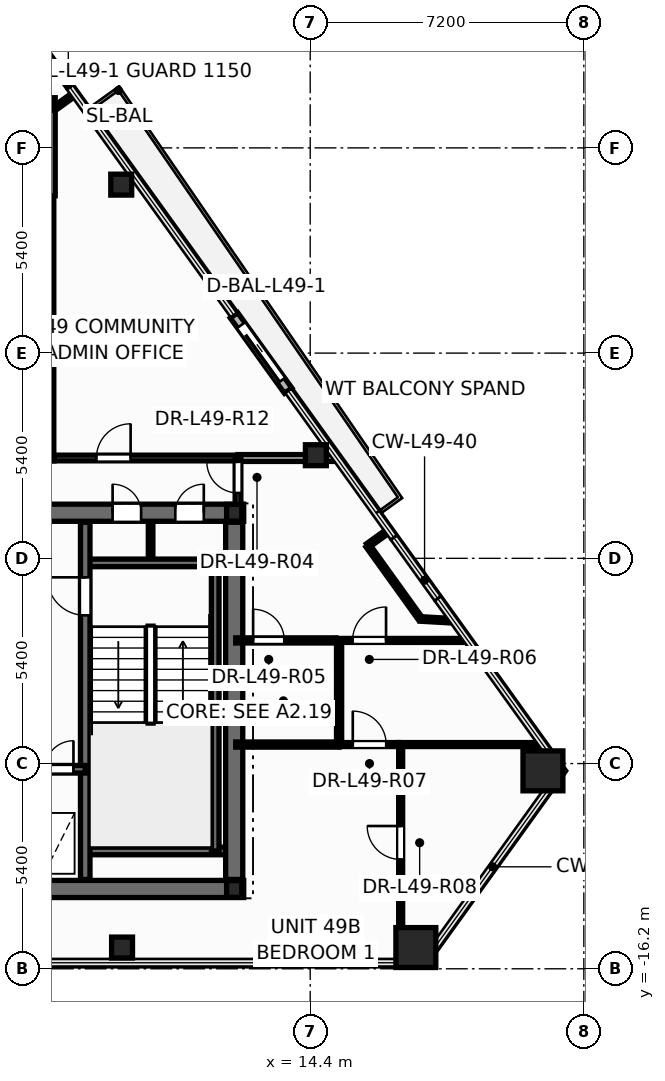
"""IFC4 building model, lengths in metres.
Left out: names, types, materials, properties, quantities, classifications, styles, units other than length and angle.
Written with IfcOpenShell. Run it as: python <this file> out.ifc"""

import sys

from ifc_helpers import new_model, si_unit, direction, frame, frame_2d, origin, origin_2d, place, context, subcontext, project, spatial, rectangle, hollow_rectangle, hollow_circle, i_section, extrude, element, fill, save


model = new_model("IFC4")
c1 = context("Model", 3, precision=1e-05, world=origin(), true_north=direction((0.0, 1.0)))
c2 = subcontext(c1, "Body", "Model", "MODEL_VIEW")
j1 = project(units=[si_unit("LENGTHUNIT", "METRE"), si_unit("PLANEANGLEUNIT", "RADIAN")], contexts=[c1])
p1 = place(None, origin())
s1 = spatial("IfcSite", under=j1, at=p1, CompositionType="ELEMENT")
p2 = place(p1, origin())
s2 = spatial("IfcBuilding", under=s1, at=p2, CompositionType="ELEMENT")
p3 = place(p2, frame((0.0, 0.0, 189.3)))
s3 = spatial("IfcBuildingStorey", under=s2, at=p3, CompositionType="ELEMENT", Elevation=189.3)
for number, where, z_axis, x_axis in (
    (1, (17.18, -15.641, 0.0), (0.0, 0.0, 1.0), (1.0, 0.0, 0.0)),
    (2, (20.524, -10.992, 0.0), (0.0, 0.0, 1.0), (1.0, 0.0, 0.0)),
):
    element("IfcColumn", number, at=place(p3, frame(where, z_axis=z_axis, x_axis=x_axis)), inside=s3, PredefinedType="COLUMN", context=c2, shape_type="SweptSolid", body=[
        extrude(hollow_rectangle(XDim=1.05, YDim=1.05, WallThickness=0.045, at=origin_2d()), origin(), (0.0, 0.0, 1.0), 3.6),
    ])
for number, where, z_axis, x_axis in (
    (3, (9.449, -15.641, 0.0), (0.0, 0.0, 1.0), (1.0, 0.0, 0.0)),
    (4, (14.549, -2.686, 0.0), (0.0, 0.0, 1.0), (1.0, 0.0, 0.0)),
    (5, (9.427, 4.433, 0.0), (0.0, 0.0, 1.0), (1.0, 0.0, 0.0)),
):
    element("IfcColumn", number, at=place(p3, frame(where, z_axis=z_axis, x_axis=x_axis)), inside=s3, PredefinedType="COLUMN", context=c2, shape_type="SweptSolid", body=[
        extrude(hollow_circle(Radius=0.275, WallThickness=0.024, at=origin_2d()), origin(), (0.0, 0.0, 1.0), 3.6),
    ])
for number, where, z_axis, x_axis in (
    (6, (12.4, -14.1, 0.0), (0.0, 0.0, 1.0), (1.0, 0.0, 0.0)),
    (7, (12.4, -4.2, 0.0), (0.0, 0.0, 1.0), (1.0, 0.0, 0.0)),
):
    element("IfcColumn", number, at=place(p3, frame(where, z_axis=z_axis, x_axis=x_axis)), inside=s3, PredefinedType="COLUMN", context=c2, shape_type="SweptSolid", body=[
        extrude(i_section(OverallWidth=0.4, OverallDepth=0.44, WebThickness=0.028, FlangeThickness=0.04, at=origin_2d()), origin(), (0.0, 0.0, 1.0), 3.6),
    ])
p4 = place(p3, frame((13.819, -0.987, -0.015), z_axis=(0.0, 0.0, 1.0), x_axis=(-0.583951454754, 0.811788579921, 0.0)))
e8 = element("IfcWall", 8, at=p4, inside=s3, PredefinedType="STANDARD", context=c2, shape_type="SweptSolid", body=[
    extrude(rectangle(XDim=2.44, YDim=0.24, at=frame_2d((1.22, 0.0))), origin(), (0.0, 0.0, 1.0), 2.807),
])
p5 = place(p4, frame((0.32, 0.0, 0.015)))
e9 = element("IfcOpeningElement", 9, at=p5, cuts=e8, PredefinedType="OPENING", context=c2, shape_type="SweptSolid", body=[
    extrude(rectangle(XDim=1.806, YDim=2.204, at=frame_2d((0.9, 1.102))), frame((0.0, 0.13, 0.0), z_axis=(0.0, -1.0, 0.0), x_axis=(1.0, 0.0, 0.0)), (0.0, 0.0, 1.0), 0.26),
])
p6 = place(p3, frame((10.2, -5.52, 0.0), z_axis=(0.0, 0.0, 1.0), x_axis=(0.0, 1.0, 0.0)))
e10 = element("IfcWall", 10, at=p6, inside=s3, PredefinedType="PARTITIONING", context=c2, shape_type="SweptSolid", body=[
    extrude(rectangle(XDim=1.12, YDim=0.12, at=frame_2d((0.56, 0.0))), origin(), (0.0, 0.0, 1.0), 3.35),
])
p7 = place(p3, frame((-12.65, -14.1, 0.0), z_axis=(0.0, 0.0, 1.0), x_axis=(1.0, 0.0, 0.0)))
e11 = element("IfcWall", 11, at=p7, inside=s3, PredefinedType="SHEAR", context=c2, shape_type="SweptSolid", body=[
    extrude(rectangle(XDim=25.3, YDim=0.45, at=frame_2d((12.65, 0.0))), origin(), (0.0, 0.0, 1.0), 3.6),
])
p8 = place(p3, frame((-12.65, -4.2, 0.0), z_axis=(0.0, 0.0, 1.0), x_axis=(1.0, 0.0, 0.0)))
e12 = element("IfcWall", 12, at=p8, inside=s3, PredefinedType="SHEAR", context=c2, shape_type="SweptSolid", body=[
    extrude(rectangle(XDim=25.3, YDim=0.45, at=frame_2d((12.65, 0.0))), origin(), (0.0, 0.0, 1.0), 3.6),
])
p9 = place(p8, frame((1.85, 0.0, 0.0)))
e13 = element("IfcOpeningElement", 13, at=p9, cuts=e12, PredefinedType="OPENING", context=c2, shape_type="SweptSolid", body=[
    extrude(rectangle(XDim=0.756, YDim=2.054, at=frame_2d((0.375, 1.027))), frame((0.0, 0.235, 0.0), z_axis=(0.0, -1.0, 0.0), x_axis=(1.0, 0.0, 0.0)), (0.0, 0.0, 1.0), 0.47),
])
p10 = place(p8, frame((21.85, 0.0, 0.0)))
e14 = element("IfcOpeningElement", 14, at=p10, cuts=e12, PredefinedType="OPENING", context=c2, shape_type="SweptSolid", body=[
    extrude(rectangle(XDim=0.756, YDim=2.054, at=frame_2d((0.375, 1.027))), frame((0.0, 0.235, 0.0), z_axis=(0.0, -1.0, 0.0), x_axis=(1.0, 0.0, 0.0)), (0.0, 0.0, 1.0), 0.47),
])
p11 = place(p8, frame((23.5, 0.0, 0.0)))
e15 = element("IfcOpeningElement", 15, at=p11, cuts=e12, PredefinedType="OPENING", context=c2, shape_type="SweptSolid", body=[
    extrude(rectangle(XDim=0.756, YDim=2.054, at=frame_2d((0.375, 1.027))), frame((0.0, 0.235, 0.0), z_axis=(0.0, -1.0, 0.0), x_axis=(1.0, 0.0, 0.0)), (0.0, 0.0, 1.0), 0.47),
])
p12 = place(p8, frame((5.85, 0.0, 0.0)))
e16 = element("IfcOpeningElement", 16, at=p12, cuts=e12, PredefinedType="OPENING", context=c2, shape_type="SweptSolid", body=[
    extrude(rectangle(XDim=1.006, YDim=2.104, at=frame_2d((0.5, 1.052))), frame((0.0, 0.235, 0.0), z_axis=(0.0, -1.0, 0.0), x_axis=(1.0, 0.0, 0.0)), (0.0, 0.0, 1.0), 0.47),
])
p13 = place(p8, frame((10.35, 0.0, 0.0)))
e17 = element("IfcOpeningElement", 17, at=p13, cuts=e12, PredefinedType="OPENING", context=c2, shape_type="SweptSolid", body=[
    extrude(rectangle(XDim=1.406, YDim=2.154, at=frame_2d((0.7, 1.077))), frame((0.0, 0.235, 0.0), z_axis=(0.0, -1.0, 0.0), x_axis=(1.0, 0.0, 0.0)), (0.0, 0.0, 1.0), 0.47),
])
p14 = place(p8, frame((18.45, 0.0, 0.0)))
e18 = element("IfcOpeningElement", 18, at=p14, cuts=e12, PredefinedType="OPENING", context=c2, shape_type="SweptSolid", body=[
    extrude(rectangle(XDim=1.006, YDim=2.104, at=frame_2d((0.5, 1.052))), frame((0.0, 0.235, 0.0), z_axis=(0.0, -1.0, 0.0), x_axis=(1.0, 0.0, 0.0)), (0.0, 0.0, 1.0), 0.47),
])
for number, where, z_axis, x_axis in (
    (19, (8.48, -5.52, 0.0), (0.0, 0.0, 1.0), (1.0, 0.0, 0.0)),
    (20, (8.48, -13.1, 0.0), (0.0, 0.0, 1.0), (1.0, 0.0, 0.0)),
):
    element("IfcWall", number, at=place(p3, frame(where, z_axis=z_axis, x_axis=x_axis)), inside=s3, PredefinedType="SOLIDWALL", context=c2, shape_type="SweptSolid", body=[
        extrude(rectangle(XDim=3.87, YDim=0.2, at=frame_2d((1.935, 0.0))), origin(), (0.0, 0.0, 1.0), 3.6),
    ])
p15 = place(p3, frame((11.9, -13.1, 0.0), z_axis=(0.0, 0.0, 1.0), x_axis=(0.0, 1.0, 0.0)))
e21 = element("IfcWall", 21, at=p15, inside=s3, PredefinedType="SOLIDWALL", context=c2, shape_type="SweptSolid", body=[
    extrude(rectangle(XDim=7.58, YDim=0.2, at=frame_2d((3.79, 0.0))), origin(), (0.0, 0.0, 1.0), 3.6),
])
p16 = place(p3, frame((8.48, -13.85, 0.0), z_axis=(0.0, 0.0, 1.0), x_axis=(0.0, 1.0, 0.0)))
e22 = element("IfcWall", 22, at=p16, inside=s3, PredefinedType="SHEAR", context=c2, shape_type="SweptSolid", body=[
    extrude(rectangle(XDim=9.4, YDim=0.25, at=frame_2d((4.7, 0.0))), origin(), (0.0, 0.0, 1.0), 3.6),
])
p17 = place(p16, frame((6.95, 0.0, 0.0)))
e23 = element("IfcOpeningElement", 23, at=p17, cuts=e22, PredefinedType="OPENING", context=c2, shape_type="SweptSolid", body=[
    extrude(rectangle(XDim=1.006, YDim=2.104, at=frame_2d((0.5, 1.052))), frame((0.0, 0.135, 0.0), z_axis=(0.0, -1.0, 0.0), x_axis=(1.0, 0.0, 0.0)), (0.0, 0.0, 1.0), 0.27),
])
p18 = place(p3, frame((5.12, -10.95, 0.0), z_axis=(0.0, 0.0, 1.0), x_axis=(1.0, 0.0, 0.0)))
e24 = element("IfcWall", 24, at=p18, inside=s3, PredefinedType="SOLIDWALL", context=c2, shape_type="SweptSolid", body=[
    extrude(rectangle(XDim=3.36, YDim=0.2, at=frame_2d((1.68, 0.0))), origin(), (0.0, 0.0, 1.0), 3.6),
])
p19 = place(p18, frame((0.42, 0.0, 0.0)))
e25 = element("IfcOpeningElement", 25, at=p19, cuts=e24, PredefinedType="OPENING", context=c2, shape_type="SweptSolid", body=[
    extrude(rectangle(XDim=1.106, YDim=2.104, at=frame_2d((0.55, 1.052))), frame((0.0, 0.11, 0.0), z_axis=(0.0, -1.0, 0.0), x_axis=(1.0, 0.0, 0.0)), (0.0, 0.0, 1.0), 0.22),
])
p20 = place(p18, frame((2.3, 0.0, 0.0)))
e26 = element("IfcOpeningElement", 26, at=p20, cuts=e24, PredefinedType="OPENING", context=c2, shape_type="SweptSolid", body=[
    extrude(rectangle(XDim=0.756, YDim=2.054, at=frame_2d((0.375, 1.027))), frame((0.0, 0.11, 0.0), z_axis=(0.0, -1.0, 0.0), x_axis=(1.0, 0.0, 0.0)), (0.0, 0.0, 1.0), 0.22),
])
p21 = place(p3, frame((12.4, -13.85, 0.0), z_axis=(0.0, 0.0, 1.0), x_axis=(0.0, 1.0, 0.0)))
e27 = element("IfcWall", 27, at=p21, inside=s3, PredefinedType="SHEAR", context=c2, shape_type="SweptSolid", body=[
    extrude(rectangle(XDim=9.4, YDim=0.45, at=frame_2d((4.7, 0.0))), origin(), (0.0, 0.0, 1.0), 3.6),
])
p22 = place(p3, frame((7.6, -2.76, 0.0), z_axis=(0.0, 0.0, 1.0), x_axis=(0.0, 1.0, 0.0)))
e28 = element("IfcWall", 28, at=p22, inside=s3, PredefinedType="PARTITIONING", context=c2, shape_type="SweptSolid", body=[
    extrude(rectangle(XDim=6.96, YDim=0.105, at=frame_2d((3.48, 0.0))), origin(), (0.0, 0.0, 1.0), 2.625),
])
p23 = place(p3, frame((16.78, -16.041, 0.0), z_axis=(0.0, 0.0, 1.0), x_axis=(0.0, 1.0, 0.0)))
e29 = element("IfcWall", 29, at=p23, inside=s3, PredefinedType="PARTITIONING", context=c2, shape_type="SweptSolid", body=[
    extrude(rectangle(XDim=5.741, YDim=0.105, at=frame_2d((2.871, 0.0))), origin(), (0.0, 0.0, 1.0), 2.792),
])
p24 = place(p23, frame((2.718, 0.0, 0.0)))
e30 = element("IfcOpeningElement", 30, at=p24, cuts=e29, PredefinedType="OPENING", context=c2, shape_type="SweptSolid", body=[
    extrude(rectangle(XDim=0.886, YDim=2.104, at=frame_2d((0.44, 1.052))), frame((0.0, 0.062, 0.0), z_axis=(0.0, -1.0, 0.0), x_axis=(1.0, 0.0, 0.0)), (0.0, 0.0, 1.0), 0.125),
])
p25 = place(p3, frame((2.36, -2.76, 0.0), z_axis=(0.0, 0.0, 1.0), x_axis=(1.0, 0.0, 0.0)))
e31 = element("IfcWall", 31, at=p25, inside=s3, PredefinedType="PARTITIONING", context=c2, shape_type="SweptSolid", body=[
    extrude(rectangle(XDim=5.3, YDim=0.15, at=frame_2d((2.65, 0.0))), origin(), (0.0, 0.0, 1.0), 2.325),
])
p26 = place(p3, frame((2.36, 4.2, 0.0), z_axis=(0.0, 0.0, 1.0), x_axis=(1.0, 0.0, 0.0)))
e32 = element("IfcWall", 32, at=p26, inside=s3, PredefinedType="PARTITIONING", context=c2, shape_type="SweptSolid", body=[
    extrude(rectangle(XDim=5.24, YDim=0.18, at=frame_2d((2.62, 0.0))), origin(), (0.0, 0.0, 1.0), 2.625),
])
p27 = place(p3, frame((7.662, -2.76, 0.0), z_axis=(0.0, 0.0, 1.0), x_axis=(1.0, 0.0, 0.0)))
e33 = element("IfcWall", 33, at=p27, inside=s3, PredefinedType="PARTITIONING", context=c2, shape_type="SweptSolid", body=[
    extrude(rectangle(XDim=4.838, YDim=0.15, at=frame_2d((2.419, 0.0))), origin(), (0.0, 0.0, 1.0), 3.35),
])
p28 = place(p27, frame((1.112, 0.0, 0.0)))
e34 = element("IfcOpeningElement", 34, at=p28, cuts=e33, PredefinedType="OPENING", context=c2, shape_type="SweptSolid", body=[
    extrude(rectangle(XDim=0.906, YDim=2.104, at=frame_2d((0.45, 1.052))), frame((0.0, 0.085, 0.0), z_axis=(0.0, -1.0, 0.0), x_axis=(1.0, 0.0, 0.0)), (0.0, 0.0, 1.0), 0.17),
])
p29 = place(p3, frame((16.72, -10.3, 0.0), z_axis=(0.0, 0.0, 1.0), x_axis=(1.0, 0.0, 0.0)))
e35 = element("IfcWall", 35, at=p29, inside=s3, PredefinedType="PARTITIONING", context=c2, shape_type="SweptSolid", body=[
    extrude(rectangle(XDim=3.799, YDim=0.105, at=frame_2d((1.899, 0.0))), origin(), (0.0, 0.0, 1.0), 2.325),
])
p30 = place(p3, frame((15.08, -7.56, 0.0), z_axis=(0.0, 0.0, 1.0), x_axis=(1.0, 0.0, 0.0)))
e36 = element("IfcWall", 36, at=p30, inside=s3, PredefinedType="PARTITIONING", context=c2, shape_type="SweptSolid", body=[
    extrude(rectangle(XDim=3.468, YDim=0.105, at=frame_2d((1.734, 0.0))), origin(), (0.0, 0.0, 1.0), 2.325),
])
p31 = place(p30, frame((0.436, 0.0, 0.0)))
e37 = element("IfcOpeningElement", 37, at=p31, cuts=e36, PredefinedType="OPENING", context=c2, shape_type="SweptSolid", body=[
    extrude(rectangle(XDim=0.886, YDim=2.104, at=frame_2d((0.44, 1.052))), frame((0.0, 0.062, 0.0), z_axis=(0.0, -1.0, 0.0), x_axis=(1.0, 0.0, 0.0)), (0.0, 0.0, 1.0), 0.125),
])
p32 = place(p3, frame((12.44, -7.56, 0.0), z_axis=(0.0, 0.0, 1.0), x_axis=(1.0, 0.0, 0.0)))
e38 = element("IfcWall", 38, at=p32, inside=s3, PredefinedType="PARTITIONING", context=c2, shape_type="SweptSolid", body=[
    extrude(rectangle(XDim=2.638, YDim=0.135, at=frame_2d((1.319, 0.0))), origin(), (0.0, 0.0, 1.0), 2.792),
])
p33 = place(p32, frame((0.458, 0.0, 0.0)))
e39 = element("IfcOpeningElement", 39, at=p33, cuts=e38, PredefinedType="OPENING", context=c2, shape_type="SweptSolid", body=[
    extrude(rectangle(XDim=0.826, YDim=2.104, at=frame_2d((0.41, 1.052))), frame((0.0, 0.078, 0.0), z_axis=(0.0, -1.0, 0.0), x_axis=(1.0, 0.0, 0.0)), (0.0, 0.0, 1.0), 0.155),
])
p34 = place(p3, frame((15.16, -10.3, 0.0), z_axis=(0.0, 0.0, 1.0), x_axis=(0.0, 1.0, 0.0)))
e40 = element("IfcWall", 40, at=p34, inside=s3, PredefinedType="PARTITIONING", context=c2, shape_type="SweptSolid", body=[
    extrude(rectangle(XDim=2.74, YDim=0.135, at=frame_2d((1.37, 0.0))), origin(), (0.0, 0.0, 1.0), 3.35),
])
p35 = place(p3, frame((12.44, -10.3, 0.0), z_axis=(0.0, 0.0, 1.0), x_axis=(1.0, 0.0, 0.0)))
e41 = element("IfcWall", 41, at=p35, inside=s3, PredefinedType="PARTITIONING", context=c2, shape_type="SweptSolid", body=[
    extrude(rectangle(XDim=2.72, YDim=0.135, at=frame_2d((1.36, 0.0))), origin(), (0.0, 0.0, 1.0), 2.792),
])
p36 = place(p3, frame((12.5, -2.76, 0.0), z_axis=(0.0, 0.0, 1.0), x_axis=(1.0, 0.0, 0.0)))
e42 = element("IfcWall", 42, at=p36, inside=s3, PredefinedType="PARTITIONING", context=c2, shape_type="SweptSolid", body=[
    extrude(rectangle(XDim=2.595, YDim=0.18, at=frame_2d((1.297, 0.0))), origin(), (0.0, 0.0, 1.0), 2.625),
])
p37 = place(p3, frame((7.6, 4.14, 0.0), z_axis=(0.0, 0.0, 1.0), x_axis=(0.0, 1.0, 0.0)))
e43 = element("IfcWall", 43, at=p37, inside=s3, PredefinedType="PARTITIONING", context=c2, shape_type="SweptSolid", body=[
    extrude(rectangle(XDim=2.58, YDim=0.18, at=frame_2d((1.29, 0.0))), origin(), (0.0, 0.0, 1.0), 2.625),
])
p38 = place(p3, frame((17.304, -6.995, 0.0), z_axis=(0.0, 0.0, 1.0), x_axis=(-0.58403154631, 0.811730960919, 0.0)))
e44 = element("IfcWall", 44, at=p38, inside=s3, PredefinedType="PARTITIONING", context=c2, shape_type="SweptSolid", body=[
    extrude(rectangle(XDim=2.378, YDim=0.12, at=frame_2d((1.189, 0.0))), origin(), (0.0, 0.0, 1.0), 3.35),
])
p39 = place(p3, frame((7.65, 6.424, 0.0), z_axis=(0.0, 0.0, 1.0), x_axis=(-0.583963896956, 0.811779629611, 0.0)))
e45 = element("IfcWall", 45, at=p39, inside=s3, PredefinedType="PARTITIONING", context=c2, shape_type="SweptSolid", body=[
    extrude(rectangle(XDim=2.378, YDim=0.12, at=frame_2d((1.189, 0.0))), origin(), (0.0, 0.0, 1.0), 3.35),
])
p40 = place(p3, frame((15.16, -10.3, 0.0), z_axis=(0.0, 0.0, 1.0), x_axis=(1.0, 0.0, 0.0)))
e46 = element("IfcWall", 46, at=p40, inside=s3, PredefinedType="PARTITIONING", context=c2, shape_type="SweptSolid", body=[
    extrude(rectangle(XDim=1.558, YDim=0.105, at=frame_2d((0.779, 0.0))), origin(), (0.0, 0.0, 1.0), 3.35),
])
p41 = place(p40, frame((0.36, 0.0, 0.0)))
e47 = element("IfcOpeningElement", 47, at=p41, cuts=e46, PredefinedType="OPENING", context=c2, shape_type="SweptSolid", body=[
    extrude(rectangle(XDim=0.886, YDim=2.104, at=frame_2d((0.44, 1.052))), frame((0.0, 0.062, 0.0), z_axis=(0.0, -1.0, 0.0), x_axis=(1.0, 0.0, 0.0)), (0.0, 0.0, 1.0), 0.125),
])
p42 = place(p3, frame((12.5, -4.24, 0.0), z_axis=(0.0, 0.0, 1.0), x_axis=(0.0, 1.0, 0.0)))
e48 = element("IfcWall", 48, at=p42, inside=s3, PredefinedType="PARTITIONING", context=c2, shape_type="SweptSolid", body=[
    extrude(rectangle(XDim=1.48, YDim=0.15, at=frame_2d((0.74, 0.0))), origin(), (0.0, 0.0, 1.0), 2.325),
])
p43 = place(p42, frame((0.56, 0.0, 0.0)))
e49 = element("IfcOpeningElement", 49, at=p43, cuts=e48, PredefinedType="OPENING", context=c2, shape_type="SweptSolid", body=[
    extrude(rectangle(XDim=0.826, YDim=2.104, at=frame_2d((0.41, 1.052))), frame((0.0, 0.085, 0.0), z_axis=(0.0, -1.0, 0.0), x_axis=(1.0, 0.0, 0.0)), (0.0, 0.0, 1.0), 0.17),
])
p44 = place(p3, frame((18.164, -7.044, 0.0), z_axis=(0.0, 0.0, 1.0), x_axis=(-0.998378240711, 0.056928801811, 0.0)))
e50 = element("IfcWall", 50, at=p44, inside=s3, PredefinedType="PARTITIONING", context=c2, shape_type="SweptSolid", body=[
    extrude(rectangle(XDim=0.862, YDim=0.12, at=frame_2d((0.431, 0.0))), origin(), (0.0, 0.0, 1.0), 2.792),
])
p45 = place(p3, frame((8.194, 6.815, 0.0), z_axis=(0.0, 0.0, 1.0), x_axis=(-0.811734696256, -0.584026354622, 0.0)))
e51 = element("IfcWall", 51, at=p45, inside=s3, PredefinedType="PARTITIONING", context=c2, shape_type="SweptSolid", body=[
    extrude(rectangle(XDim=0.67, YDim=0.12, at=frame_2d((0.335, 0.0))), origin(), (0.0, 0.0, 1.0), 2.792),
])
p46 = place(p3, frame((15.915, -5.064, 0.0), z_axis=(0.0, 0.0, 1.0), x_axis=(0.811907418628, 0.583786213932, 0.0)))
e52 = element("IfcWall", 52, at=p46, inside=s3, PredefinedType="PARTITIONING", context=c2, shape_type="SweptSolid", body=[
    extrude(rectangle(XDim=0.67, YDim=0.12, at=frame_2d((0.335, 0.0))), origin(), (0.0, 0.0, 1.0), 2.792),
])
p47 = place(p5, origin())
e53 = element("IfcDoor", 53, at=p47, inside=s3, OperationType="SLIDING_TO_LEFT", PredefinedType="DOOR", context=c2, shape_type="SweptSolid", body=[
    extrude(rectangle(XDim=1.8, YDim=2.2, at=frame_2d((0.9, 1.1))), frame((0.0, 0.025, 0.0), z_axis=(0.0, -1.0, 0.0), x_axis=(1.0, 0.0, 0.0)), (0.0, 0.0, 1.0), 0.05),
])
fill(e9, e53)
p48 = place(p17, origin())
e54 = element("IfcDoor", 54, at=p48, inside=s3, OperationType="SINGLE_SWING_RIGHT", PredefinedType="DOOR", context=c2, shape_type="SweptSolid", body=[
    extrude(rectangle(XDim=1.0, YDim=2.1, at=frame_2d((0.5, 1.05))), frame((0.0, 0.025, 0.0), z_axis=(0.0, -1.0, 0.0), x_axis=(1.0, 0.0, 0.0)), (0.0, 0.0, 1.0), 0.05),
])
fill(e23, e54)
p49 = place(p20, origin())
e55 = element("IfcDoor", 55, at=p49, inside=s3, OperationType="SINGLE_SWING_RIGHT", PredefinedType="DOOR", context=c2, shape_type="SweptSolid", body=[
    extrude(rectangle(XDim=0.75, YDim=2.05, at=frame_2d((0.375, 1.025))), frame((0.0, 0.025, 0.0), z_axis=(0.0, -1.0, 0.0), x_axis=(1.0, 0.0, 0.0)), (0.0, 0.0, 1.0), 0.05),
])
fill(e26, e55)
p50 = place(p10, origin())
e56 = element("IfcDoor", 56, at=p50, inside=s3, OperationType="SINGLE_SWING_LEFT", PredefinedType="DOOR", context=c2, shape_type="SweptSolid", body=[
    extrude(rectangle(XDim=0.75, YDim=2.05, at=frame_2d((0.375, 1.025))), frame((0.0, 0.025, 0.0), z_axis=(0.0, -1.0, 0.0), x_axis=(1.0, 0.0, 0.0)), (0.0, 0.0, 1.0), 0.05),
])
fill(e14, e56)
p51 = place(p11, origin())
e57 = element("IfcDoor", 57, at=p51, inside=s3, OperationType="SINGLE_SWING_RIGHT", PredefinedType="DOOR", context=c2, shape_type="SweptSolid", body=[
    extrude(rectangle(XDim=0.75, YDim=2.05, at=frame_2d((0.375, 1.025))), frame((0.0, 0.025, 0.0), z_axis=(0.0, -1.0, 0.0), x_axis=(1.0, 0.0, 0.0)), (0.0, 0.0, 1.0), 0.05),
])
fill(e15, e57)
p52 = place(p43, origin())
e58 = element("IfcDoor", 58, at=p52, inside=s3, OperationType="SINGLE_SWING_RIGHT", PredefinedType="DOOR", context=c2, shape_type="SweptSolid", body=[
    extrude(rectangle(XDim=0.82, YDim=2.1, at=frame_2d((0.41, 1.05))), frame((0.0, 0.025, 0.0), z_axis=(0.0, -1.0, 0.0), x_axis=(1.0, 0.0, 0.0)), (0.0, 0.0, 1.0), 0.05),
])
fill(e49, e58)
p53 = place(p33, origin())
e59 = element("IfcDoor", 59, at=p53, inside=s3, OperationType="SINGLE_SWING_LEFT", PredefinedType="DOOR", context=c2, shape_type="SweptSolid", body=[
    extrude(rectangle(XDim=0.82, YDim=2.1, at=frame_2d((0.41, 1.05))), frame((0.0, 0.025, 0.0), z_axis=(0.0, -1.0, 0.0), x_axis=(1.0, 0.0, 0.0)), (0.0, 0.0, 1.0), 0.05),
])
fill(e39, e59)
p54 = place(p31, origin())
e60 = element("IfcDoor", 60, at=p54, inside=s3, OperationType="SINGLE_SWING_RIGHT", PredefinedType="DOOR", context=c2, shape_type="SweptSolid", body=[
    extrude(rectangle(XDim=0.88, YDim=2.1, at=frame_2d((0.44, 1.05))), frame((0.0, 0.025, 0.0), z_axis=(0.0, -1.0, 0.0), x_axis=(1.0, 0.0, 0.0)), (0.0, 0.0, 1.0), 0.05),
])
fill(e37, e60)
p55 = place(p41, origin())
e61 = element("IfcDoor", 61, at=p55, inside=s3, OperationType="SINGLE_SWING_LEFT", PredefinedType="DOOR", context=c2, shape_type="SweptSolid", body=[
    extrude(rectangle(XDim=0.88, YDim=2.1, at=frame_2d((0.44, 1.05))), frame((0.0, 0.025, 0.0), z_axis=(0.0, -1.0, 0.0), x_axis=(1.0, 0.0, 0.0)), (0.0, 0.0, 1.0), 0.05),
])
fill(e47, e61)
p56 = place(p24, origin())
e62 = element("IfcDoor", 62, at=p56, inside=s3, OperationType="SINGLE_SWING_RIGHT", PredefinedType="DOOR", context=c2, shape_type="SweptSolid", body=[
    extrude(rectangle(XDim=0.88, YDim=2.1, at=frame_2d((0.44, 1.05))), frame((0.0, 0.025, 0.0), z_axis=(0.0, -1.0, 0.0), x_axis=(1.0, 0.0, 0.0)), (0.0, 0.0, 1.0), 0.05),
])
fill(e30, e62)
p57 = place(p28, origin())
e63 = element("IfcDoor", 63, at=p57, inside=s3, OperationType="SINGLE_SWING_RIGHT", PredefinedType="DOOR", context=c2, shape_type="SweptSolid", body=[
    extrude(rectangle(XDim=0.9, YDim=2.1, at=frame_2d((0.45, 1.05))), frame((0.0, 0.025, 0.0), z_axis=(0.0, -1.0, 0.0), x_axis=(1.0, 0.0, 0.0)), (0.0, 0.0, 1.0), 0.05),
])
fill(e34, e63)
save(model, sys.argv[1])
